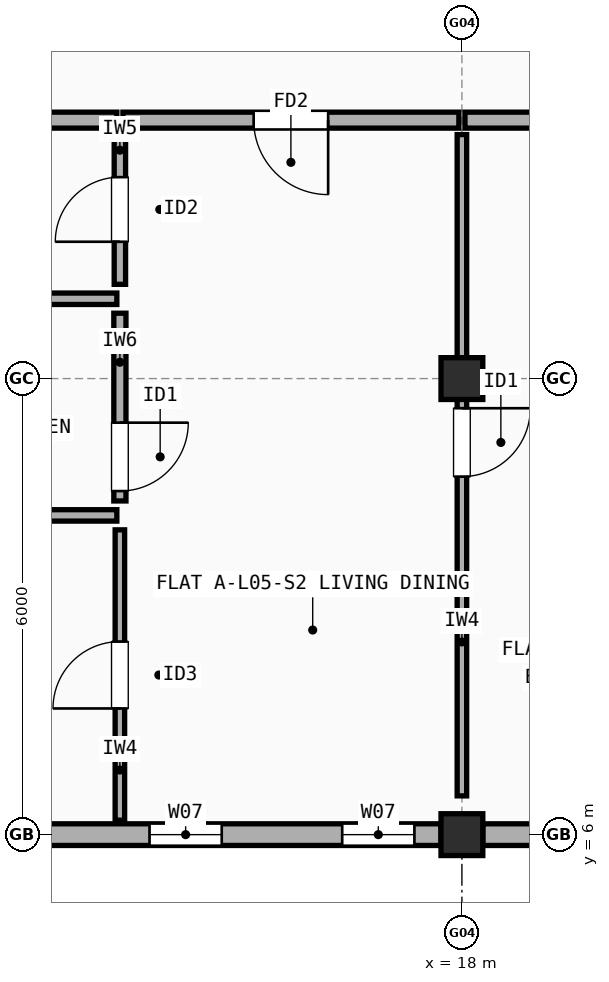
"""IFC4 building model, lengths in metres.
Left out: names, types, materials, properties, quantities, classifications, styles, units other than length and angle.
Written with IfcOpenShell. Run it as: python <this file> out.ifc"""

import sys

from ifc_helpers import new_model, si_unit, direction, frame, frame_2d, origin, origin_2d, place, context, subcontext, project, spatial, rectangle, extrude, element, fill, save


model = new_model("IFC4")
c1 = context("Model", 3, precision=1e-05, world=origin(), true_north=direction((0.0, 1.0)))
c2 = subcontext(c1, "Body", "Model", "MODEL_VIEW")
j1 = project(units=[si_unit("LENGTHUNIT", "METRE"), si_unit("PLANEANGLEUNIT", "RADIAN")], contexts=[c1])
p1 = place(None, origin())
s1 = spatial("IfcSite", under=j1, at=p1, CompositionType="ELEMENT")
p2 = place(p1, origin())
s2 = spatial("IfcBuilding", under=s1, at=p2, CompositionType="ELEMENT")
p3 = place(p2, frame((0.0, 0.0, 17.3)))
s3 = spatial("IfcBuildingStorey", under=s2, at=p3, CompositionType="ELEMENT", Elevation=17.3)
for number, where, z_axis, x_axis in (
    (1, (18.0, 6.0, 0.0), (0.0, 0.0, 1.0), (1.0, 0.0, 0.0)),
    (2, (18.0, 12.0, 0.0), (0.0, 0.0, 1.0), (1.0, 0.0, 0.0)),
):
    element("IfcColumn", number, at=place(p3, frame(where, z_axis=z_axis, x_axis=x_axis)), inside=s3, PredefinedType="COLUMN", context=c2, shape_type="SweptSolid", body=[
        extrude(rectangle(XDim=0.55, YDim=0.55, at=origin_2d()), origin(), (0.0, 0.0, 1.0), 2.965),
    ])
p4 = place(p3, frame((12.275, 6.0, 0.0), z_axis=(0.0, 0.0, 1.0), x_axis=(1.0, 0.0, 0.0)))
e3 = element("IfcWall", 3, at=p4, inside=s3, PredefinedType="STANDARD", context=c2, shape_type="SweptSolid", body=[
    extrude(rectangle(XDim=5.45, YDim=0.285, at=frame_2d((2.725, 0.0))), origin(), (0.0, 0.0, 1.0), 2.447),
])
p5 = place(p4, frame((1.615, 0.0, 0.9)))
e4 = element("IfcOpeningElement", 4, at=p5, cuts=e3, PredefinedType="OPENING", context=c2, shape_type="SweptSolid", body=[
    extrude(rectangle(XDim=0.95, YDim=1.35, at=frame_2d((0.475, 0.675))), frame((0.0, 0.152, 0.0), z_axis=(0.0, -1.0, 0.0), x_axis=(1.0, 0.0, 0.0)), (0.0, 0.0, 1.0), 0.305),
])
p6 = place(p4, frame((4.15, 0.0, 0.9)))
e5 = element("IfcOpeningElement", 5, at=p6, cuts=e3, PredefinedType="OPENING", context=c2, shape_type="SweptSolid", body=[
    extrude(rectangle(XDim=0.95, YDim=1.35, at=frame_2d((0.475, 0.675))), frame((0.0, 0.152, 0.0), z_axis=(0.0, -1.0, 0.0), x_axis=(1.0, 0.0, 0.0)), (0.0, 0.0, 1.0), 0.305),
])
p7 = place(p3, frame((18.275, 6.0, 0.0), z_axis=(0.0, 0.0, 1.0), x_axis=(1.0, 0.0, 0.0)))
e6 = element("IfcWall", 6, at=p7, inside=s3, PredefinedType="STANDARD", context=c2, shape_type="SweptSolid", body=[
    extrude(rectangle(XDim=5.45, YDim=0.285, at=frame_2d((2.725, 0.0))), origin(), (0.0, 0.0, 1.0), 2.447),
])
p8 = place(p7, frame((0.742, 0.0, 0.9)))
e7 = element("IfcOpeningElement", 7, at=p8, cuts=e6, PredefinedType="OPENING", context=c2, shape_type="SweptSolid", body=[
    extrude(rectangle(XDim=1.2, YDim=1.35, at=frame_2d((0.6, 0.675))), frame((0.0, 0.152, 0.0), z_axis=(0.0, -1.0, 0.0), x_axis=(1.0, 0.0, 0.0)), (0.0, 0.0, 1.0), 0.305),
])
p9 = place(p7, frame((3.708, 0.0, 0.9)))
e8 = element("IfcOpeningElement", 8, at=p9, cuts=e6, PredefinedType="OPENING", context=c2, shape_type="SweptSolid", body=[
    extrude(rectangle(XDim=0.8, YDim=1.2, at=frame_2d((0.4, 0.6))), frame((0.0, 0.152, 0.0), z_axis=(0.0, -1.0, 0.0), x_axis=(1.0, 0.0, 0.0)), (0.0, 0.0, 1.0), 0.305),
])
p10 = place(p3, frame((9.04, 15.4, 0.0), z_axis=(0.0, 0.0, 1.0), x_axis=(1.0, 0.0, 0.0)))
e9 = element("IfcWall", 9, at=p10, inside=s3, PredefinedType="SOLIDWALL", context=c2, shape_type="SweptSolid", body=[
    extrude(rectangle(XDim=4.42, YDim=0.21, at=frame_2d((2.21, 0.0))), origin(), (0.0, 0.0, 1.0), 2.458),
])
p11 = place(p3, frame((13.54, 15.4, 0.0), z_axis=(0.0, 0.0, 1.0), x_axis=(1.0, 0.0, 0.0)))
e10 = element("IfcWall", 10, at=p11, inside=s3, PredefinedType="SOLIDWALL", context=c2, shape_type="SweptSolid", body=[
    extrude(rectangle(XDim=4.42, YDim=0.21, at=frame_2d((2.21, 0.0))), origin(), (0.0, 0.0, 1.0), 2.508),
])
p12 = place(p11, frame((1.72, 0.0, 0.0)))
e11 = element("IfcOpeningElement", 11, at=p12, cuts=e10, PredefinedType="OPENING", context=c2, shape_type="SweptSolid", body=[
    extrude(rectangle(XDim=0.98, YDim=2.15, at=frame_2d((0.49, 1.075))), frame((0.0, 0.115, 0.0), z_axis=(0.0, -1.0, 0.0), x_axis=(1.0, 0.0, 0.0)), (0.0, 0.0, 1.0), 0.23),
])
p13 = place(p3, frame((13.5, 6.19, 0.0), z_axis=(0.0, 0.0, 1.0), x_axis=(0.0, 1.0, 0.0)))
e12 = element("IfcWall", 12, at=p13, inside=s3, PredefinedType="PARTITIONING", context=c2, shape_type="SweptSolid", body=[
    extrude(rectangle(XDim=3.82, YDim=0.125, at=frame_2d((1.91, 0.0))), origin(), (0.0, 0.0, 1.0), 2.965),
])
p14 = place(p13, frame((1.47, 0.0, 0.0)))
e13 = element("IfcOpeningElement", 13, at=p14, cuts=e12, PredefinedType="OPENING", context=c2, shape_type="SweptSolid", body=[
    extrude(rectangle(XDim=0.88, YDim=2.1, at=frame_2d((0.44, 1.05))), frame((0.0, 0.073, 0.0), z_axis=(0.0, -1.0, 0.0), x_axis=(1.0, 0.0, 0.0)), (0.0, 0.0, 1.0), 0.145),
])
p15 = place(p3, frame((13.5, 10.39, 0.0), z_axis=(0.0, 0.0, 1.0), x_axis=(0.0, 1.0, 0.0)))
e14 = element("IfcWall", 14, at=p15, inside=s3, PredefinedType="PLUMBINGWALL", context=c2, shape_type="SweptSolid", body=[
    extrude(rectangle(XDim=2.47, YDim=0.16, at=frame_2d((1.235, 0.0))), origin(), (0.0, 0.0, 1.0), 2.508),
])
p16 = place(p15, frame((0.13, 0.0, 0.0)))
e15 = element("IfcOpeningElement", 15, at=p16, cuts=e14, PredefinedType="OPENING", context=c2, shape_type="SweptSolid", body=[
    extrude(rectangle(XDim=0.9, YDim=2.1, at=frame_2d((0.45, 1.05))), frame((0.0, 0.09, 0.0), z_axis=(0.0, -1.0, 0.0), x_axis=(1.0, 0.0, 0.0)), (0.0, 0.0, 1.0), 0.18),
])
p17 = place(p3, frame((13.5, 13.24, 0.0), z_axis=(0.0, 0.0, 1.0), x_axis=(0.0, 1.0, 0.0)))
e16 = element("IfcWall", 16, at=p17, inside=s3, PredefinedType="PARTITIONING", context=c2, shape_type="SweptSolid", body=[
    extrude(rectangle(XDim=1.97, YDim=0.15, at=frame_2d((0.985, 0.0))), origin(), (0.0, 0.0, 1.0), 2.965),
])
p18 = place(p17, frame((0.56, 0.0, 0.0)))
e17 = element("IfcOpeningElement", 17, at=p18, cuts=e16, PredefinedType="OPENING", context=c2, shape_type="SweptSolid", body=[
    extrude(rectangle(XDim=0.85, YDim=2.1, at=frame_2d((0.425, 1.05))), frame((0.0, 0.085, 0.0), z_axis=(0.0, -1.0, 0.0), x_axis=(1.0, 0.0, 0.0)), (0.0, 0.0, 1.0), 0.17),
])
p19 = place(p3, frame((9.04, 10.2, 0.0), z_axis=(0.0, 0.0, 1.0), x_axis=(1.0, 0.0, 0.0)))
e18 = element("IfcWall", 18, at=p19, inside=s3, PredefinedType="PARTITIONING", context=c2, shape_type="SweptSolid", body=[
    extrude(rectangle(XDim=4.42, YDim=0.15, at=frame_2d((2.21, 0.0))), origin(), (0.0, 0.0, 1.0), 2.508),
])
p20 = place(p3, frame((9.04, 13.05, 0.0), z_axis=(0.0, 0.0, 1.0), x_axis=(1.0, 0.0, 0.0)))
e19 = element("IfcWall", 19, at=p20, inside=s3, PredefinedType="PARTITIONING", context=c2, shape_type="SweptSolid", body=[
    extrude(rectangle(XDim=4.42, YDim=0.15, at=frame_2d((2.21, 0.0))), origin(), (0.0, 0.0, 1.0), 2.458),
])
p21 = place(p3, frame((18.04, 15.4, 0.0), z_axis=(0.0, 0.0, 1.0), x_axis=(1.0, 0.0, 0.0)))
e20 = element("IfcWall", 20, at=p21, inside=s3, PredefinedType="SOLIDWALL", context=c2, shape_type="SweptSolid", body=[
    extrude(rectangle(XDim=2.92, YDim=0.21, at=frame_2d((1.46, 0.0))), origin(), (0.0, 0.0, 1.0), 2.508),
])
p22 = place(p3, frame((18.0, 6.51, 0.0), z_axis=(0.0, 0.0, 1.0), x_axis=(0.0, 1.0, 0.0)))
e21 = element("IfcWall", 21, at=p22, inside=s3, PredefinedType="PARTITIONING", context=c2, shape_type="SweptSolid", body=[
    extrude(rectangle(XDim=8.7, YDim=0.125, at=frame_2d((4.35, 0.0))), origin(), (0.0, 0.0, 1.0), 2.508),
])
p23 = place(p22, frame((4.2, 0.0, 0.0)))
e22 = element("IfcOpeningElement", 22, at=p23, cuts=e21, PredefinedType="OPENING", context=c2, shape_type="SweptSolid", body=[
    extrude(rectangle(XDim=0.9, YDim=2.1, at=frame_2d((0.45, 1.05))), frame((0.0, 0.073, 0.0), z_axis=(0.0, -1.0, 0.0), x_axis=(1.0, 0.0, 0.0)), (0.0, 0.0, 1.0), 0.145),
])
p24 = place(p5, origin())
e23 = element("IfcWindow", 23, at=p24, inside=s3, PartitioningType="SINGLE_PANEL", PredefinedType="WINDOW", context=c2, shape_type="SweptSolid", body=[
    extrude(rectangle(XDim=0.95, YDim=1.35, at=frame_2d((0.475, 0.675))), frame((0.0, 0.03, 0.0), z_axis=(0.0, -1.0, 0.0), x_axis=(1.0, 0.0, 0.0)), (0.0, 0.0, 1.0), 0.06),
])
fill(e4, e23)
p25 = place(p6, origin())
e24 = element("IfcWindow", 24, at=p25, inside=s3, PartitioningType="SINGLE_PANEL", PredefinedType="WINDOW", context=c2, shape_type="SweptSolid", body=[
    extrude(rectangle(XDim=0.95, YDim=1.35, at=frame_2d((0.475, 0.675))), frame((0.0, 0.03, 0.0), z_axis=(0.0, -1.0, 0.0), x_axis=(1.0, 0.0, 0.0)), (0.0, 0.0, 1.0), 0.06),
])
fill(e5, e24)
p26 = place(p12, origin())
e25 = element("IfcDoor", 25, at=p26, inside=s3, OperationType="SINGLE_SWING_RIGHT", PredefinedType="DOOR", context=c2, shape_type="SweptSolid", body=[
    extrude(rectangle(XDim=0.98, YDim=2.15, at=frame_2d((0.49, 1.075))), frame((0.0, 0.025, 0.0), z_axis=(0.0, -1.0, 0.0), x_axis=(1.0, 0.0, 0.0)), (0.0, 0.0, 1.0), 0.05),
])
fill(e11, e25)
p27 = place(p14, origin())
e26 = element("IfcDoor", 26, at=p27, inside=s3, OperationType="SINGLE_SWING_LEFT", PredefinedType="DOOR", context=c2, shape_type="SweptSolid", body=[
    extrude(rectangle(XDim=0.88, YDim=2.1, at=frame_2d((0.44, 1.05))), frame((0.0, 0.025, 0.0), z_axis=(0.0, -1.0, 0.0), x_axis=(1.0, 0.0, 0.0)), (0.0, 0.0, 1.0), 0.05),
])
fill(e13, e26)
p28 = place(p16, origin())
e27 = element("IfcDoor", 27, at=p28, inside=s3, OperationType="SINGLE_SWING_RIGHT", PredefinedType="DOOR", context=c2, shape_type="SweptSolid", body=[
    extrude(rectangle(XDim=0.9, YDim=2.1, at=frame_2d((0.45, 1.05))), frame((0.0, 0.025, 0.0), z_axis=(0.0, -1.0, 0.0), x_axis=(1.0, 0.0, 0.0)), (0.0, 0.0, 1.0), 0.05),
])
fill(e15, e27)
p29 = place(p18, origin())
e28 = element("IfcDoor", 28, at=p29, inside=s3, OperationType="SINGLE_SWING_LEFT", PredefinedType="DOOR", context=c2, shape_type="SweptSolid", body=[
    extrude(rectangle(XDim=0.85, YDim=2.1, at=frame_2d((0.425, 1.05))), frame((0.0, 0.025, 0.0), z_axis=(0.0, -1.0, 0.0), x_axis=(1.0, 0.0, 0.0)), (0.0, 0.0, 1.0), 0.05),
])
fill(e17, e28)
p30 = place(p23, origin())
e29 = element("IfcDoor", 29, at=p30, inside=s3, OperationType="SINGLE_SWING_RIGHT", PredefinedType="DOOR", context=c2, shape_type="SweptSolid", body=[
    extrude(rectangle(XDim=0.9, YDim=2.1, at=frame_2d((0.45, 1.05))), frame((0.0, 0.025, 0.0), z_axis=(0.0, -1.0, 0.0), x_axis=(1.0, 0.0, 0.0)), (0.0, 0.0, 1.0), 0.05),
])
fill(e22, e29)
save(model, sys.argv[1])
